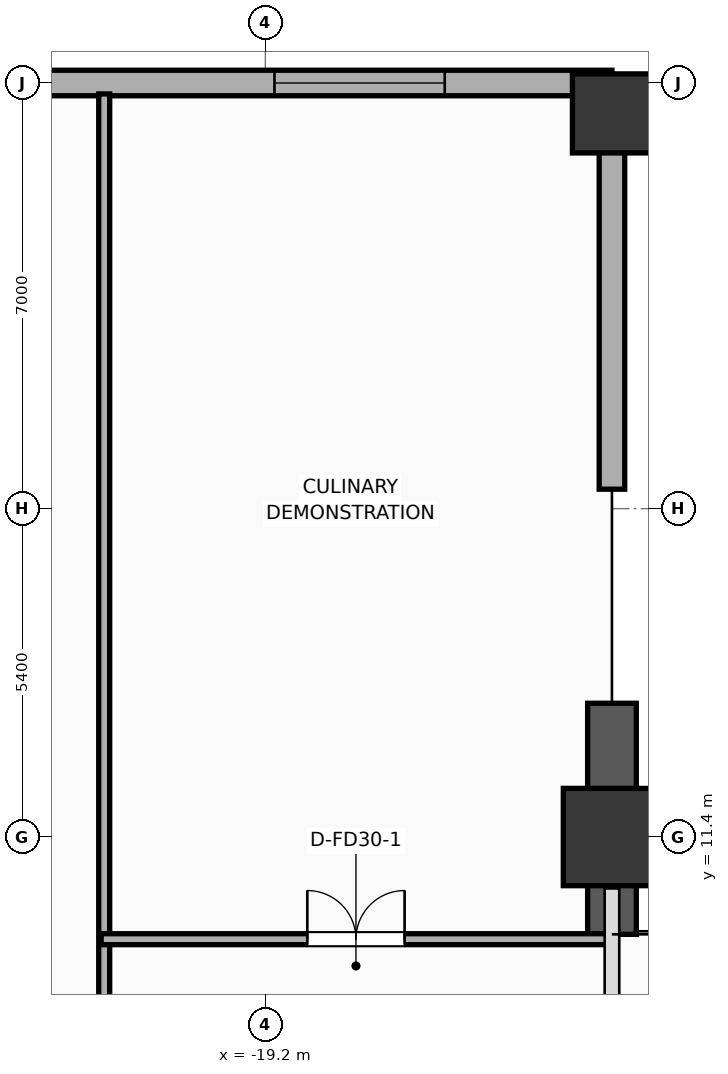
"""IFC4 building model, lengths in metres.
Left out: names, types, materials, properties, quantities, classifications, styles, units other than length and angle.
Written with IfcOpenShell. Run it as: python <this file> out.ifc"""

import sys

from ifc_helpers import new_model, si_unit, direction, frame, frame_2d, origin, origin_2d, place, context, subcontext, project, spatial, rectangle, extrude, element, fill, save


model = new_model("IFC4")
c1 = context("Model", 3, precision=1e-05, world=origin(), true_north=direction((0.0, 1.0)))
c2 = subcontext(c1, "Body", "Model", "MODEL_VIEW")
j1 = project(units=[si_unit("LENGTHUNIT", "METRE"), si_unit("PLANEANGLEUNIT", "RADIAN")], contexts=[c1])
p1 = place(None, origin())
s1 = spatial("IfcSite", under=j1, at=p1, CompositionType="ELEMENT")
p2 = place(p1, origin())
s2 = spatial("IfcBuilding", under=s1, at=p2, CompositionType="ELEMENT")
p3 = place(p2, frame((0.0, 0.0, 15.6)))
s3 = spatial("IfcBuildingStorey", under=s2, at=p3, CompositionType="ELEMENT", Elevation=15.6)
p4 = place(p3, frame((-13.5, 11.4, 0.0), z_axis=(0.0, 0.0, 1.0), x_axis=(1.0, 0.0, 0.0)))
e1 = element("IfcColumn", 1, at=p4, inside=s3, PredefinedType="COLUMN", context=c2, shape_type="SweptSolid", body=[
    extrude(rectangle(XDim=1.6, YDim=1.6, at=origin_2d()), origin(), (0.0, 0.0, 1.0), 5.2),
])
p5 = place(p3, frame((-13.5, 23.3, 0.0), z_axis=(0.0, 0.0, 1.0), x_axis=(1.0, 0.0, 0.0)))
e2 = element("IfcColumn", 2, at=p5, inside=s3, PredefinedType="COLUMN", context=c2, shape_type="SweptSolid", body=[
    extrude(rectangle(XDim=1.3, YDim=1.3, at=origin_2d()), origin(), (0.0, 0.0, 1.0), 5.2),
])
p6 = place(p3, frame((-13.5, 9.8, 0.0), z_axis=(0.0, 0.0, 1.0), x_axis=(0.0, 1.0, 0.0)))
e3 = element("IfcWall", 3, at=p6, inside=s3, PredefinedType="SOLIDWALL", context=c2, shape_type="SweptSolid", body=[
    extrude(rectangle(XDim=3.8, YDim=0.8, at=frame_2d((1.9, 0.0))), origin(), (0.0, 0.0, 1.0), 4.8),
])
p7 = place(p3, frame((-13.5, 17.12, 0.0), z_axis=(0.0, 0.0, 1.0), x_axis=(0.0, 1.0, 0.0)))
e4 = element("IfcWall", 4, at=p7, inside=s3, PredefinedType="ELEMENTEDWALL", context=c2, shape_type="SweptSolid", body=[
    extrude(rectangle(XDim=6.68, YDim=0.42, at=frame_2d((3.34, 0.0))), origin(), (0.0, 0.0, 1.0), 4.09),
])
p8 = place(p3, frame((-13.5, 23.8, 0.0), z_axis=(0.0, 0.0, 1.0), x_axis=(-1.0, 0.0, 0.0)))
e5 = element("IfcWall", 5, at=p8, inside=s3, PredefinedType="ELEMENTEDWALL", context=c2, shape_type="SweptSolid", body=[
    extrude(rectangle(XDim=24.9, YDim=0.42, at=frame_2d((12.45, 0.0))), origin(), (0.0, 0.0, 1.0), 4.8),
])
p9 = place(p8, frame((2.75, 0.0, 0.65)))
e6 = element("IfcOpeningElement", 6, at=p9, cuts=e5, PredefinedType="OPENING", context=c2, shape_type="SweptSolid", body=[
    extrude(rectangle(XDim=2.8, YDim=2.6, at=frame_2d((1.4, 1.3))), frame((0.0, 0.22, 0.0), z_axis=(0.0, -1.0, 0.0), x_axis=(1.0, 0.0, 0.0)), (0.0, 0.0, 1.0), 0.44),
])
p10 = place(p8, frame((19.35, 0.0, 0.65)))
e7 = element("IfcOpeningElement", 7, at=p10, cuts=e5, PredefinedType="OPENING", context=c2, shape_type="SweptSolid", body=[
    extrude(rectangle(XDim=2.8, YDim=2.6, at=frame_2d((1.4, 1.3))), frame((0.0, 0.22, 0.0), z_axis=(0.0, -1.0, 0.0), x_axis=(1.0, 0.0, 0.0)), (0.0, 0.0, 1.0), 0.44),
])
p11 = place(p3, frame((-21.85, -10.5, 0.0), z_axis=(0.0, 0.0, 1.0), x_axis=(0.0, 1.0, 0.0)))
e8 = element("IfcWall", 8, at=p11, inside=s3, PredefinedType="PARTITIONING", context=c2, shape_type="SweptSolid", body=[
    extrude(rectangle(XDim=34.12, YDim=0.18, at=frame_2d((17.06, 0.0))), origin(), (0.0, 0.0, 1.0), 4.8),
])
p12 = place(p11, frame((13.531, 0.0, 0.0)))
e9 = element("IfcOpeningElement", 9, at=p12, cuts=e8, PredefinedType="OPENING", context=c2, shape_type="SweptSolid", body=[
    extrude(rectangle(XDim=1.6, YDim=2.05, at=frame_2d((0.8, 1.025))), frame((0.0, 0.1, 0.0), z_axis=(0.0, -1.0, 0.0), x_axis=(1.0, 0.0, 0.0)), (0.0, 0.0, 1.0), 0.2),
])
p13 = place(p3, frame((-21.9, 9.72, 0.0), z_axis=(0.0, 0.0, 1.0), x_axis=(1.0, 0.0, 0.0)))
e10 = element("IfcWall", 10, at=p13, inside=s3, PredefinedType="PARTITIONING", context=c2, shape_type="SweptSolid", body=[
    extrude(rectangle(XDim=8.38, YDim=0.18, at=frame_2d((4.19, 0.0))), origin(), (0.0, 0.0, 1.0), 4.8),
])
p14 = place(p13, frame((3.39, 0.0, 0.0)))
e11 = element("IfcOpeningElement", 11, at=p14, cuts=e10, PredefinedType="OPENING", context=c2, shape_type="SweptSolid", body=[
    extrude(rectangle(XDim=1.6, YDim=2.05, at=frame_2d((0.8, 1.025))), frame((0.0, 0.1, 0.0), z_axis=(0.0, -1.0, 0.0), x_axis=(1.0, 0.0, 0.0)), (0.0, 0.0, 1.0), 0.2),
])
p15 = place(p9, origin())
e12 = element("IfcWindow", 12, at=p15, inside=s3, PartitioningType="SINGLE_PANEL", PredefinedType="WINDOW", context=c2, shape_type="SweptSolid", body=[
    extrude(rectangle(XDim=2.8, YDim=2.6, at=frame_2d((1.4, 1.3))), frame((0.0, 0.03, 0.0), z_axis=(0.0, -1.0, 0.0), x_axis=(1.0, 0.0, 0.0)), (0.0, 0.0, 1.0), 0.06),
])
fill(e6, e12)
p16 = place(p14, origin())
e13 = element("IfcDoor", 13, at=p16, inside=s3, OperationType="DOUBLE_DOOR_SINGLE_SWING", PredefinedType="DOOR", context=c2, shape_type="SweptSolid", body=[
    extrude(rectangle(XDim=1.6, YDim=2.05, at=frame_2d((0.8, 1.025))), frame((0.0, 0.025, 0.0), z_axis=(0.0, -1.0, 0.0), x_axis=(1.0, 0.0, 0.0)), (0.0, 0.0, 1.0), 0.05),
])
fill(e11, e13)
save(model, sys.argv[1])
